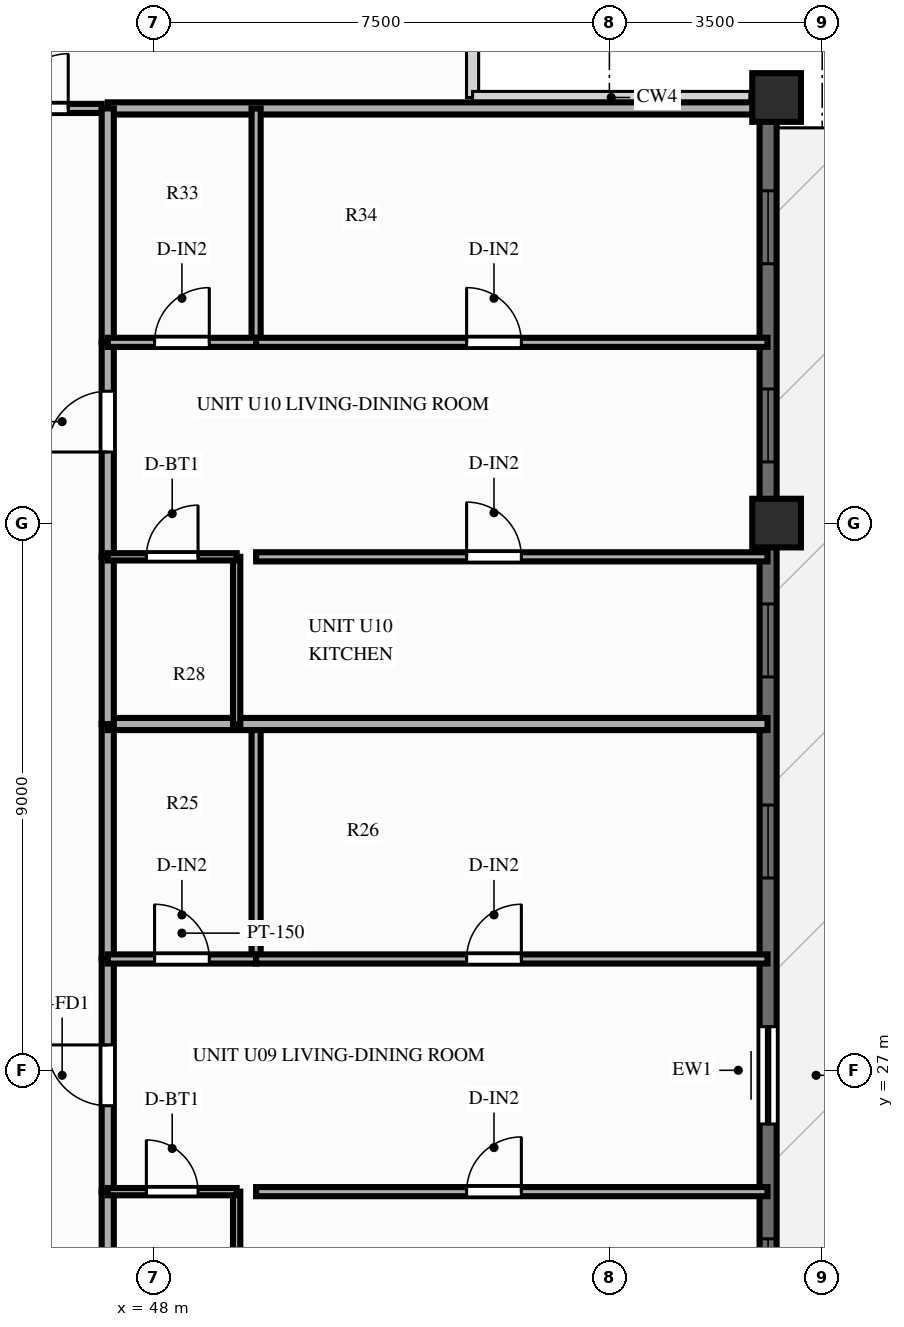
"""IFC4 building model, lengths in metres.
Left out: names, types, materials, properties, quantities, classifications, styles, units other than length and angle.
Written with IfcOpenShell. Run it as: python <this file> out.ifc"""

import sys

from ifc_helpers import new_model, si_unit, direction, frame, frame_2d, origin, origin_2d, place, context, subcontext, project, spatial, rectangle, extrude, source, transform, mapped, element, fill, save


model = new_model("IFC4")
c1 = context("Model", 3, precision=1e-05, world=origin(), true_north=direction((0.0, 1.0)))
c2 = subcontext(c1, "Body", "Model", "MODEL_VIEW")
j1 = project(units=[si_unit("LENGTHUNIT", "METRE"), si_unit("PLANEANGLEUNIT", "RADIAN")], contexts=[c1])
p1 = place(None, origin())
s1 = spatial("IfcSite", under=j1, at=p1, CompositionType="ELEMENT")
p2 = place(p1, origin())
s2 = spatial("IfcBuilding", under=s1, at=p2, CompositionType="ELEMENT")
p3 = place(p2, frame((0.0, 0.0, 176.8)))
s3 = spatial("IfcBuildingStorey", under=s2, at=p3, CompositionType="ELEMENT", Elevation=176.8)
m1 = source(origin(), c2, "Body", "SweptSolid", [
    extrude(rectangle(XDim=0.8, YDim=0.8, at=origin_2d()), origin(), (0.0, 0.0, 1.0), 3.0),
])
for number, where, z_axis, x_axis in (
    (1, (58.25, 36.0, 0.0), (0.0, 0.0, 1.0), (1.0, 0.0, 0.0)),
    (2, (58.25, 43.0, 0.0), (0.0, 0.0, 1.0), (1.0, 0.0, 0.0)),
):
    element("IfcColumn", number, at=place(p3, frame(where, z_axis=z_axis, x_axis=x_axis)), inside=s3, PredefinedType="COLUMN", context=c2, shape_type="MappedRepresentation", body=[
        mapped(m1, transform((0.0, 0.0, 0.0), scale=1.0)),
    ])
p4 = place(p3, frame((58.11, 11.0, 0.0), z_axis=(0.0, 0.0, 1.0), x_axis=(0.0, 1.0, 0.0)))
e3 = element("IfcWall", 3, at=p4, inside=s3, PredefinedType="SOLIDWALL", context=c2, shape_type="SweptSolid", body=[
    extrude(rectangle(XDim=32.0, YDim=0.28, at=frame_2d((16.0, 0.0))), origin(), (0.0, 0.0, 1.0), 2.28),
])
p5 = place(p4, frame((1.05, 0.0, 0.25)))
e4 = element("IfcOpeningElement", 4, at=p5, cuts=e3, PredefinedType="OPENING", context=c2, shape_type="SweptSolid", body=[
    extrude(rectangle(XDim=1.2, YDim=1.5, at=frame_2d((0.6, 0.75))), frame((0.0, 0.152, 0.0), z_axis=(0.0, -1.0, 0.0), x_axis=(1.0, 0.0, 0.0)), (0.0, 0.0, 1.0), 0.304),
])
p6 = place(p4, frame((4.31, 0.0, 0.25)))
e5 = element("IfcOpeningElement", 5, at=p6, cuts=e3, PredefinedType="OPENING", context=c2, shape_type="SweptSolid", body=[
    extrude(rectangle(XDim=1.2, YDim=1.5, at=frame_2d((0.6, 0.75))), frame((0.0, 0.152, 0.0), z_axis=(0.0, -1.0, 0.0), x_axis=(1.0, 0.0, 0.0)), (0.0, 0.0, 1.0), 0.304),
])
p7 = place(p4, frame((8.882, 0.0, 0.25)))
e6 = element("IfcOpeningElement", 6, at=p7, cuts=e3, PredefinedType="OPENING", context=c2, shape_type="SweptSolid", body=[
    extrude(rectangle(XDim=1.2, YDim=1.5, at=frame_2d((0.6, 0.75))), frame((0.0, 0.152, 0.0), z_axis=(0.0, -1.0, 0.0), x_axis=(1.0, 0.0, 0.0)), (0.0, 0.0, 1.0), 0.304),
])
p8 = place(p4, frame((12.029, 0.0, 0.25)))
e7 = element("IfcOpeningElement", 7, at=p8, cuts=e3, PredefinedType="OPENING", context=c2, shape_type="SweptSolid", body=[
    extrude(rectangle(XDim=1.2, YDim=1.5, at=frame_2d((0.6, 0.75))), frame((0.0, 0.152, 0.0), z_axis=(0.0, -1.0, 0.0), x_axis=(1.0, 0.0, 0.0)), (0.0, 0.0, 1.0), 0.304),
])
p9 = place(p4, frame((16.718, 0.0, 0.0), z_axis=(0.0, 0.0, 1.0), x_axis=(-1.0, 0.0, 0.0)))
e8 = element("IfcOpeningElement", 8, at=p9, cuts=e3, PredefinedType="OPENING", context=c2, shape_type="SweptSolid", body=[
    extrude(rectangle(XDim=1.6, YDim=2.15, at=frame_2d((0.8, 1.075))), frame((0.0, 0.152, 0.0), z_axis=(0.0, -1.0, 0.0), x_axis=(1.0, 0.0, 0.0)), (0.0, 0.0, 1.0), 0.304),
])
p10 = place(p4, frame((19.163, 0.0, 0.25)))
e9 = element("IfcOpeningElement", 9, at=p10, cuts=e3, PredefinedType="OPENING", context=c2, shape_type="SweptSolid", body=[
    extrude(rectangle(XDim=1.2, YDim=1.5, at=frame_2d((0.6, 0.75))), frame((0.0, 0.152, 0.0), z_axis=(0.0, -1.0, 0.0), x_axis=(1.0, 0.0, 0.0)), (0.0, 0.0, 1.0), 0.304),
])
p11 = place(p4, frame((22.47, 0.0, 0.25)))
e10 = element("IfcOpeningElement", 10, at=p11, cuts=e3, PredefinedType="OPENING", context=c2, shape_type="SweptSolid", body=[
    extrude(rectangle(XDim=1.2, YDim=1.5, at=frame_2d((0.6, 0.75))), frame((0.0, 0.152, 0.0), z_axis=(0.0, -1.0, 0.0), x_axis=(1.0, 0.0, 0.0)), (0.0, 0.0, 1.0), 0.304),
])
p12 = place(p4, frame((26.006, 0.0, 0.25)))
e11 = element("IfcOpeningElement", 11, at=p12, cuts=e3, PredefinedType="OPENING", context=c2, shape_type="SweptSolid", body=[
    extrude(rectangle(XDim=1.2, YDim=1.5, at=frame_2d((0.6, 0.75))), frame((0.0, 0.152, 0.0), z_axis=(0.0, -1.0, 0.0), x_axis=(1.0, 0.0, 0.0)), (0.0, 0.0, 1.0), 0.304),
])
p13 = place(p4, frame((29.266, 0.0, 0.25)))
e12 = element("IfcOpeningElement", 12, at=p13, cuts=e3, PredefinedType="OPENING", context=c2, shape_type="SweptSolid", body=[
    extrude(rectangle(XDim=1.2, YDim=1.5, at=frame_2d((0.6, 0.75))), frame((0.0, 0.152, 0.0), z_axis=(0.0, -1.0, 0.0), x_axis=(1.0, 0.0, 0.0)), (0.0, 0.0, 1.0), 0.304),
])
p14 = place(p3, frame((44.82, 42.82, 0.0), z_axis=(0.0, 0.0, 1.0), x_axis=(1.0, 0.0, 0.0)))
e13 = element("IfcWall", 13, at=p14, inside=s3, PredefinedType="PARTITIONING", context=c2, shape_type="SweptSolid", body=[
    extrude(rectangle(XDim=2.33, YDim=0.15, at=frame_2d((1.165, 0.0))), origin(), (0.0, 0.0, 1.0), 2.79),
])
p15 = place(p14, frame((0.88, 0.0, 0.0)))
e14 = element("IfcOpeningElement", 14, at=p15, cuts=e13, PredefinedType="OPENING", context=c2, shape_type="SweptSolid", body=[
    extrude(rectangle(XDim=0.9, YDim=2.1, at=frame_2d((0.45, 1.05))), frame((0.0, 0.087, 0.0), z_axis=(0.0, -1.0, 0.0), x_axis=(1.0, 0.0, 0.0)), (0.0, 0.0, 1.0), 0.174),
])
p16 = place(p3, frame((47.25, 42.82, 0.0), z_axis=(0.0, 0.0, 1.0), x_axis=(1.0, 0.0, 0.0)))
e15 = element("IfcWall", 15, at=p16, inside=s3, PredefinedType="PARTITIONING", context=c2, shape_type="SweptSolid", body=[
    extrude(rectangle(XDim=10.85, YDim=0.2, at=frame_2d((5.425, 0.0))), origin(), (0.0, 0.0, 1.0), 2.79),
])
p17 = place(p3, frame((47.25, 22.254, 0.0), z_axis=(0.0, 0.0, 1.0), x_axis=(0.0, 1.0, 0.0)))
e16 = element("IfcWall", 16, at=p17, inside=s3, PredefinedType="PARTITIONING", context=c2, shape_type="SweptSolid", body=[
    extrude(rectangle(XDim=2.75, YDim=0.2, at=frame_2d((1.375, 0.0))), origin(), (0.0, 0.0, 1.0), 2.79),
])
p18 = place(p3, frame((47.25, 25.004, 0.0), z_axis=(0.0, 0.0, 1.0), x_axis=(0.0, 1.0, 0.0)))
e17 = element("IfcWall", 17, at=p18, inside=s3, PredefinedType="PARTITIONING", context=c2, shape_type="SweptSolid", body=[
    extrude(rectangle(XDim=3.827, YDim=0.2, at=frame_2d((1.914, 0.0))), origin(), (0.0, 0.0, 1.0), 2.79),
])
p19 = place(p18, frame((1.413, 0.0, 0.0)))
e18 = element("IfcOpeningElement", 18, at=p19, cuts=e17, PredefinedType="OPENING", context=c2, shape_type="SweptSolid", body=[
    extrude(rectangle(XDim=1.0, YDim=2.15, at=frame_2d((0.5, 1.075))), frame((0.0, 0.112, 0.0), z_axis=(0.0, -1.0, 0.0), x_axis=(1.0, 0.0, 0.0)), (0.0, 0.0, 1.0), 0.224),
])
p20 = place(p3, frame((47.25, 28.831, 0.0), z_axis=(0.0, 0.0, 1.0), x_axis=(0.0, 1.0, 0.0)))
e19 = element("IfcWall", 19, at=p20, inside=s3, PredefinedType="PARTITIONING", context=c2, shape_type="SweptSolid", body=[
    extrude(rectangle(XDim=3.865, YDim=0.2, at=frame_2d((1.932, 0.0))), origin(), (0.0, 0.0, 1.0), 2.79),
])
p21 = place(p3, frame((49.37, 22.254, 0.0), z_axis=(0.0, 0.0, 1.0), x_axis=(0.0, 1.0, 0.0)))
e20 = element("IfcWall", 20, at=p21, inside=s3, PredefinedType="PARTITIONING", context=c2, shape_type="SweptSolid", body=[
    extrude(rectangle(XDim=2.75, YDim=0.12, at=frame_2d((1.375, 0.0))), origin(), (0.0, 0.0, 1.0), 2.79),
])
p22 = place(p3, frame((49.69, 28.831, 0.0), z_axis=(0.0, 0.0, 1.0), x_axis=(0.0, 1.0, 0.0)))
e21 = element("IfcWall", 21, at=p22, inside=s3, PredefinedType="PARTITIONING", context=c2, shape_type="SweptSolid", body=[
    extrude(rectangle(XDim=3.865, YDim=0.15, at=frame_2d((1.932, 0.0))), origin(), (0.0, 0.0, 1.0), 2.79),
])
p23 = place(p3, frame((47.25, 25.004, 0.0), z_axis=(0.0, 0.0, 1.0), x_axis=(1.0, 0.0, 0.0)))
e22 = element("IfcWall", 22, at=p23, inside=s3, PredefinedType="PARTITIONING", context=c2, shape_type="SweptSolid", body=[
    extrude(rectangle(XDim=2.12, YDim=0.12, at=frame_2d((1.06, 0.0))), origin(), (0.0, 0.0, 1.0), 2.79),
])
p24 = place(p23, frame((0.635, 0.0, 0.0)))
e23 = element("IfcOpeningElement", 23, at=p24, cuts=e22, PredefinedType="OPENING", context=c2, shape_type="SweptSolid", body=[
    extrude(rectangle(XDim=0.85, YDim=2.05, at=frame_2d((0.425, 1.025))), frame((0.0, 0.072, 0.0), z_axis=(0.0, -1.0, 0.0), x_axis=(1.0, 0.0, 0.0)), (0.0, 0.0, 1.0), 0.144),
])
p25 = place(p3, frame((49.69, 25.004, 0.0), z_axis=(0.0, 0.0, 1.0), x_axis=(1.0, 0.0, 0.0)))
e24 = element("IfcWall", 24, at=p25, inside=s3, PredefinedType="PARTITIONING", context=c2, shape_type="SweptSolid", body=[
    extrude(rectangle(XDim=8.41, YDim=0.15, at=frame_2d((4.205, 0.0))), origin(), (0.0, 0.0, 1.0), 2.79),
])
p26 = place(p25, frame((3.462, 0.0, 0.0)))
e25 = element("IfcOpeningElement", 25, at=p26, cuts=e24, PredefinedType="OPENING", context=c2, shape_type="SweptSolid", body=[
    extrude(rectangle(XDim=0.9, YDim=2.1, at=frame_2d((0.45, 1.05))), frame((0.0, 0.087, 0.0), z_axis=(0.0, -1.0, 0.0), x_axis=(1.0, 0.0, 0.0)), (0.0, 0.0, 1.0), 0.174),
])
p27 = place(p3, frame((47.25, 28.831, 0.0), z_axis=(0.0, 0.0, 1.0), x_axis=(1.0, 0.0, 0.0)))
e26 = element("IfcWall", 26, at=p27, inside=s3, PredefinedType="PARTITIONING", context=c2, shape_type="SweptSolid", body=[
    extrude(rectangle(XDim=2.44, YDim=0.15, at=frame_2d((1.22, 0.0))), origin(), (0.0, 0.0, 1.0), 2.79),
])
p28 = place(p27, frame((0.77, 0.0, 0.0)))
e27 = element("IfcOpeningElement", 27, at=p28, cuts=e26, PredefinedType="OPENING", context=c2, shape_type="SweptSolid", body=[
    extrude(rectangle(XDim=0.9, YDim=2.1, at=frame_2d((0.45, 1.05))), frame((0.0, 0.087, 0.0), z_axis=(0.0, -1.0, 0.0), x_axis=(1.0, 0.0, 0.0)), (0.0, 0.0, 1.0), 0.174),
])
p29 = place(p3, frame((49.69, 28.831, 0.0), z_axis=(0.0, 0.0, 1.0), x_axis=(1.0, 0.0, 0.0)))
e28 = element("IfcWall", 28, at=p29, inside=s3, PredefinedType="PARTITIONING", context=c2, shape_type="SweptSolid", body=[
    extrude(rectangle(XDim=8.41, YDim=0.15, at=frame_2d((4.205, 0.0))), origin(), (0.0, 0.0, 1.0), 2.79),
])
p30 = place(p29, frame((3.462, 0.0, 0.0)))
e29 = element("IfcOpeningElement", 29, at=p30, cuts=e28, PredefinedType="OPENING", context=c2, shape_type="SweptSolid", body=[
    extrude(rectangle(XDim=0.9, YDim=2.1, at=frame_2d((0.45, 1.05))), frame((0.0, 0.087, 0.0), z_axis=(0.0, -1.0, 0.0), x_axis=(1.0, 0.0, 0.0)), (0.0, 0.0, 1.0), 0.174),
])
p31 = place(p3, frame((47.25, 32.695, 0.0), z_axis=(0.0, 0.0, 1.0), x_axis=(1.0, 0.0, 0.0)))
e30 = element("IfcWall", 30, at=p31, inside=s3, PredefinedType="PARTITIONING", context=c2, shape_type="SweptSolid", body=[
    extrude(rectangle(XDim=10.85, YDim=0.2, at=frame_2d((5.425, 0.0))), origin(), (0.0, 0.0, 1.0), 2.79),
])
p32 = place(p3, frame((47.25, 32.695, 0.0), z_axis=(0.0, 0.0, 1.0), x_axis=(0.0, 1.0, 0.0)))
e31 = element("IfcWall", 31, at=p32, inside=s3, PredefinedType="PARTITIONING", context=c2, shape_type="SweptSolid", body=[
    extrude(rectangle(XDim=2.75, YDim=0.2, at=frame_2d((1.375, 0.0))), origin(), (0.0, 0.0, 1.0), 2.79),
])
p33 = place(p3, frame((47.25, 35.445, 0.0), z_axis=(0.0, 0.0, 1.0), x_axis=(0.0, 1.0, 0.0)))
e32 = element("IfcWall", 32, at=p33, inside=s3, PredefinedType="PARTITIONING", context=c2, shape_type="SweptSolid", body=[
    extrude(rectangle(XDim=3.527, YDim=0.2, at=frame_2d((1.764, 0.0))), origin(), (0.0, 0.0, 1.0), 2.79),
])
p34 = place(p33, frame((1.724, 0.0, 0.0)))
e33 = element("IfcOpeningElement", 33, at=p34, cuts=e32, PredefinedType="OPENING", context=c2, shape_type="SweptSolid", body=[
    extrude(rectangle(XDim=1.0, YDim=2.15, at=frame_2d((0.5, 1.075))), frame((0.0, 0.112, 0.0), z_axis=(0.0, -1.0, 0.0), x_axis=(1.0, 0.0, 0.0)), (0.0, 0.0, 1.0), 0.224),
])
p35 = place(p3, frame((47.25, 38.973, 0.0), z_axis=(0.0, 0.0, 1.0), x_axis=(0.0, 1.0, 0.0)))
e34 = element("IfcWall", 34, at=p35, inside=s3, PredefinedType="PARTITIONING", context=c2, shape_type="SweptSolid", body=[
    extrude(rectangle(XDim=3.847, YDim=0.2, at=frame_2d((1.924, 0.0))), origin(), (0.0, 0.0, 1.0), 2.79),
])
p36 = place(p3, frame((49.37, 32.695, 0.0), z_axis=(0.0, 0.0, 1.0), x_axis=(0.0, 1.0, 0.0)))
e35 = element("IfcWall", 35, at=p36, inside=s3, PredefinedType="PARTITIONING", context=c2, shape_type="SweptSolid", body=[
    extrude(rectangle(XDim=2.75, YDim=0.12, at=frame_2d((1.375, 0.0))), origin(), (0.0, 0.0, 1.0), 2.79),
])
p37 = place(p3, frame((49.69, 38.973, 0.0), z_axis=(0.0, 0.0, 1.0), x_axis=(0.0, 1.0, 0.0)))
e36 = element("IfcWall", 36, at=p37, inside=s3, PredefinedType="PARTITIONING", context=c2, shape_type="SweptSolid", body=[
    extrude(rectangle(XDim=3.847, YDim=0.15, at=frame_2d((1.924, 0.0))), origin(), (0.0, 0.0, 1.0), 2.79),
])
p38 = place(p3, frame((47.25, 35.445, 0.0), z_axis=(0.0, 0.0, 1.0), x_axis=(1.0, 0.0, 0.0)))
e37 = element("IfcWall", 37, at=p38, inside=s3, PredefinedType="PARTITIONING", context=c2, shape_type="SweptSolid", body=[
    extrude(rectangle(XDim=2.12, YDim=0.12, at=frame_2d((1.06, 0.0))), origin(), (0.0, 0.0, 1.0), 2.79),
])
p39 = place(p38, frame((0.635, 0.0, 0.0)))
e38 = element("IfcOpeningElement", 38, at=p39, cuts=e37, PredefinedType="OPENING", context=c2, shape_type="SweptSolid", body=[
    extrude(rectangle(XDim=0.85, YDim=2.05, at=frame_2d((0.425, 1.025))), frame((0.0, 0.072, 0.0), z_axis=(0.0, -1.0, 0.0), x_axis=(1.0, 0.0, 0.0)), (0.0, 0.0, 1.0), 0.144),
])
p40 = place(p3, frame((49.69, 35.445, 0.0), z_axis=(0.0, 0.0, 1.0), x_axis=(1.0, 0.0, 0.0)))
e39 = element("IfcWall", 39, at=p40, inside=s3, PredefinedType="PARTITIONING", context=c2, shape_type="SweptSolid", body=[
    extrude(rectangle(XDim=8.41, YDim=0.15, at=frame_2d((4.205, 0.0))), origin(), (0.0, 0.0, 1.0), 2.79),
])
p41 = place(p40, frame((3.462, 0.0, 0.0)))
e40 = element("IfcOpeningElement", 40, at=p41, cuts=e39, PredefinedType="OPENING", context=c2, shape_type="SweptSolid", body=[
    extrude(rectangle(XDim=0.9, YDim=2.1, at=frame_2d((0.45, 1.05))), frame((0.0, 0.087, 0.0), z_axis=(0.0, -1.0, 0.0), x_axis=(1.0, 0.0, 0.0)), (0.0, 0.0, 1.0), 0.174),
])
p42 = place(p3, frame((47.25, 38.973, 0.0), z_axis=(0.0, 0.0, 1.0), x_axis=(1.0, 0.0, 0.0)))
e41 = element("IfcWall", 41, at=p42, inside=s3, PredefinedType="PARTITIONING", context=c2, shape_type="SweptSolid", body=[
    extrude(rectangle(XDim=2.44, YDim=0.15, at=frame_2d((1.22, 0.0))), origin(), (0.0, 0.0, 1.0), 2.79),
])
p43 = place(p42, frame((0.77, 0.0, 0.0)))
e42 = element("IfcOpeningElement", 42, at=p43, cuts=e41, PredefinedType="OPENING", context=c2, shape_type="SweptSolid", body=[
    extrude(rectangle(XDim=0.9, YDim=2.1, at=frame_2d((0.45, 1.05))), frame((0.0, 0.087, 0.0), z_axis=(0.0, -1.0, 0.0), x_axis=(1.0, 0.0, 0.0)), (0.0, 0.0, 1.0), 0.174),
])
p44 = place(p3, frame((49.69, 38.973, 0.0), z_axis=(0.0, 0.0, 1.0), x_axis=(1.0, 0.0, 0.0)))
e43 = element("IfcWall", 43, at=p44, inside=s3, PredefinedType="PARTITIONING", context=c2, shape_type="SweptSolid", body=[
    extrude(rectangle(XDim=8.41, YDim=0.15, at=frame_2d((4.205, 0.0))), origin(), (0.0, 0.0, 1.0), 2.79),
])
p45 = place(p44, frame((3.462, 0.0, 0.0)))
e44 = element("IfcOpeningElement", 44, at=p45, cuts=e43, PredefinedType="OPENING", context=c2, shape_type="SweptSolid", body=[
    extrude(rectangle(XDim=0.9, YDim=2.1, at=frame_2d((0.45, 1.05))), frame((0.0, 0.087, 0.0), z_axis=(0.0, -1.0, 0.0), x_axis=(1.0, 0.0, 0.0)), (0.0, 0.0, 1.0), 0.174),
])
m2 = source(origin(), c2, "Body", "SweptSolid", [
    extrude(rectangle(XDim=1.2, YDim=1.5, at=frame_2d((0.6, 0.75))), frame((0.0, 0.03, 0.0), z_axis=(0.0, -1.0, 0.0), x_axis=(1.0, 0.0, 0.0)), (0.0, 0.0, 1.0), 0.06),
])
p46 = place(p8, origin())
e45 = element("IfcWindow", 45, at=p46, inside=s3, PartitioningType="SINGLE_PANEL", PredefinedType="WINDOW", context=c2, shape_type="MappedRepresentation", body=[
    mapped(m2, transform((0.0, 0.0, 0.0), scale=1.0)),
])
fill(e7, e45)
m3 = source(origin(), c2, "Body", "SweptSolid", [
    extrude(rectangle(XDim=1.6, YDim=2.15, at=frame_2d((0.8, 1.075))), frame((0.0, 0.025, 0.0), z_axis=(0.0, -1.0, 0.0), x_axis=(1.0, 0.0, 0.0)), (0.0, 0.0, 1.0), 0.05),
])
p47 = place(p9, origin())
e46 = element("IfcDoor", 46, at=p47, inside=s3, OperationType="SLIDING_TO_LEFT", PredefinedType="DOOR", context=c2, shape_type="MappedRepresentation", body=[
    mapped(m3, transform((0.0, 0.0, 0.0), scale=1.0)),
])
fill(e8, e46)
p48 = place(p10, origin())
e47 = element("IfcWindow", 47, at=p48, inside=s3, PartitioningType="SINGLE_PANEL", PredefinedType="WINDOW", context=c2, shape_type="MappedRepresentation", body=[
    mapped(m2, transform((0.0, 0.0, 0.0), scale=1.0)),
])
fill(e9, e47)
p49 = place(p11, origin())
e48 = element("IfcWindow", 48, at=p49, inside=s3, PartitioningType="SINGLE_PANEL", PredefinedType="WINDOW", context=c2, shape_type="MappedRepresentation", body=[
    mapped(m2, transform((0.0, 0.0, 0.0), scale=1.0)),
])
fill(e10, e48)
p50 = place(p12, origin())
e49 = element("IfcWindow", 49, at=p50, inside=s3, PartitioningType="SINGLE_PANEL", PredefinedType="WINDOW", context=c2, shape_type="MappedRepresentation", body=[
    mapped(m2, transform((0.0, 0.0, 0.0), scale=1.0)),
])
fill(e11, e49)
p51 = place(p13, origin())
e50 = element("IfcWindow", 50, at=p51, inside=s3, PartitioningType="SINGLE_PANEL", PredefinedType="WINDOW", context=c2, shape_type="MappedRepresentation", body=[
    mapped(m2, transform((0.0, 0.0, 0.0), scale=1.0)),
])
fill(e12, e50)
m4 = source(origin(), c2, "Body", "SweptSolid", [
    extrude(rectangle(XDim=0.9, YDim=2.1, at=frame_2d((0.45, 1.05))), frame((0.0, 0.025, 0.0), z_axis=(0.0, -1.0, 0.0), x_axis=(1.0, 0.0, 0.0)), (0.0, 0.0, 1.0), 0.05),
])
p52 = place(p15, origin())
e51 = element("IfcDoor", 51, at=p52, inside=s3, OperationType="SINGLE_SWING_RIGHT", PredefinedType="DOOR", context=c2, shape_type="MappedRepresentation", body=[
    mapped(m4, transform((0.0, 0.0, 0.0), scale=1.0)),
])
fill(e14, e51)
m5 = source(origin(), c2, "Body", "SweptSolid", [
    extrude(rectangle(XDim=1.0, YDim=2.15, at=frame_2d((0.5, 1.075))), frame((0.0, 0.025, 0.0), z_axis=(0.0, -1.0, 0.0), x_axis=(1.0, 0.0, 0.0)), (0.0, 0.0, 1.0), 0.05),
])
p53 = place(p19, origin())
e52 = element("IfcDoor", 52, at=p53, inside=s3, OperationType="SINGLE_SWING_RIGHT", PredefinedType="DOOR", context=c2, shape_type="MappedRepresentation", body=[
    mapped(m5, transform((0.0, 0.0, 0.0), scale=1.0)),
])
fill(e18, e52)
m6 = source(origin(), c2, "Body", "SweptSolid", [
    extrude(rectangle(XDim=0.85, YDim=2.05, at=frame_2d((0.425, 1.025))), frame((0.0, 0.025, 0.0), z_axis=(0.0, -1.0, 0.0), x_axis=(1.0, 0.0, 0.0)), (0.0, 0.0, 1.0), 0.05),
])
p54 = place(p24, origin())
e53 = element("IfcDoor", 53, at=p54, inside=s3, OperationType="SINGLE_SWING_LEFT", PredefinedType="DOOR", context=c2, shape_type="MappedRepresentation", body=[
    mapped(m6, transform((0.0, 0.0, 0.0), scale=1.0)),
])
fill(e23, e53)
p55 = place(p26, origin())
e54 = element("IfcDoor", 54, at=p55, inside=s3, OperationType="SINGLE_SWING_RIGHT", PredefinedType="DOOR", context=c2, shape_type="MappedRepresentation", body=[
    mapped(m4, transform((0.0, 0.0, 0.0), scale=1.0)),
])
fill(e25, e54)
p56 = place(p28, origin())
e55 = element("IfcDoor", 55, at=p56, inside=s3, OperationType="SINGLE_SWING_LEFT", PredefinedType="DOOR", context=c2, shape_type="MappedRepresentation", body=[
    mapped(m4, transform((0.0, 0.0, 0.0), scale=1.0)),
])
fill(e27, e55)
p57 = place(p30, origin())
e56 = element("IfcDoor", 56, at=p57, inside=s3, OperationType="SINGLE_SWING_RIGHT", PredefinedType="DOOR", context=c2, shape_type="MappedRepresentation", body=[
    mapped(m4, transform((0.0, 0.0, 0.0), scale=1.0)),
])
fill(e29, e56)
p58 = place(p34, origin())
e57 = element("IfcDoor", 57, at=p58, inside=s3, OperationType="SINGLE_SWING_LEFT", PredefinedType="DOOR", context=c2, shape_type="MappedRepresentation", body=[
    mapped(m5, transform((0.0, 0.0, 0.0), scale=1.0)),
])
fill(e33, e57)
p59 = place(p39, origin())
e58 = element("IfcDoor", 58, at=p59, inside=s3, OperationType="SINGLE_SWING_RIGHT", PredefinedType="DOOR", context=c2, shape_type="MappedRepresentation", body=[
    mapped(m6, transform((0.0, 0.0, 0.0), scale=1.0)),
])
fill(e38, e58)
p60 = place(p41, origin())
e59 = element("IfcDoor", 59, at=p60, inside=s3, OperationType="SINGLE_SWING_LEFT", PredefinedType="DOOR", context=c2, shape_type="MappedRepresentation", body=[
    mapped(m4, transform((0.0, 0.0, 0.0), scale=1.0)),
])
fill(e40, e59)
p61 = place(p43, origin())
e60 = element("IfcDoor", 60, at=p61, inside=s3, OperationType="SINGLE_SWING_RIGHT", PredefinedType="DOOR", context=c2, shape_type="MappedRepresentation", body=[
    mapped(m4, transform((0.0, 0.0, 0.0), scale=1.0)),
])
fill(e42, e60)
p62 = place(p45, origin())
e61 = element("IfcDoor", 61, at=p62, inside=s3, OperationType="SINGLE_SWING_LEFT", PredefinedType="DOOR", context=c2, shape_type="MappedRepresentation", body=[
    mapped(m4, transform((0.0, 0.0, 0.0), scale=1.0)),
])
fill(e44, e61)
save(model, sys.argv[1])
